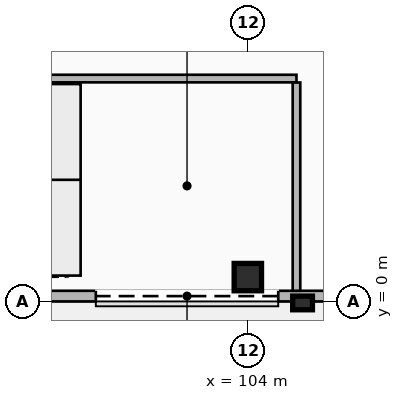
"""IFC4 building model, lengths in metres.
Left out: names, types, materials, properties, quantities, classifications, styles, units other than length and angle.
Written with IfcOpenShell. Run it as: python <this file> out.ifc"""

import sys

from ifc_helpers import new_model, si_unit, direction, frame, frame_2d, origin, origin_2d, place, context, subcontext, project, spatial, rectangle, extrude, element, fill, save


model = new_model("IFC4")
c1 = context("Model", 3, precision=1e-05, world=origin(), true_north=direction((0.0, 1.0)))
c2 = subcontext(c1, "Body", "Model", "MODEL_VIEW")
j1 = project(units=[si_unit("LENGTHUNIT", "METRE"), si_unit("PLANEANGLEUNIT", "RADIAN")], contexts=[c1])
p1 = place(None, origin())
s1 = spatial("IfcSite", under=j1, at=p1, CompositionType="ELEMENT")
p2 = place(p1, origin())
s2 = spatial("IfcBuilding", under=s1, at=p2, CompositionType="ELEMENT")
p3 = place(p2, origin())
s3 = spatial("IfcBuildingStorey", under=s2, at=p3, CompositionType="ELEMENT", Elevation=0.0)
p4 = place(p3, frame((104.0, 0.8, 0.0), z_axis=(0.0, 0.0, 1.0), x_axis=(1.0, 0.0, 0.0)))
e1 = element("IfcColumn", 1, at=p4, inside=s3, PredefinedType="COLUMN", context=c2, shape_type="SweptSolid", body=[
    extrude(rectangle(XDim=0.9, YDim=0.9, at=origin_2d()), origin(), (0.0, 0.0, 1.0), 5.14),
])
p5 = place(p3, frame((144.0, 0.175, 0.0), z_axis=(0.0, 0.0, 1.0), x_axis=(-1.0, 0.0, 0.0)))
e2 = element("IfcWall", 2, at=p5, inside=s3, PredefinedType="SOLIDWALL", context=c2, shape_type="SweptSolid", body=[
    extrude(rectangle(XDim=144.0, YDim=0.35, at=frame_2d((72.0, 0.0))), origin(), (0.0, 0.0, 1.0), 5.14),
])
p6 = place(p5, frame((39.0, 0.0, 0.0)))
e3 = element("IfcOpeningElement", 3, at=p6, cuts=e2, PredefinedType="OPENING", context=c2, shape_type="SweptSolid", body=[
    extrude(rectangle(XDim=6.0, YDim=3.2, at=frame_2d((3.0, 1.6))), frame((0.0, 0.185, 0.0), z_axis=(0.0, -1.0, 0.0), x_axis=(1.0, 0.0, 0.0)), (0.0, 0.0, 1.0), 0.37),
])
p7 = place(p5, frame((73.2, 0.0, 0.0)))
e4 = element("IfcOpeningElement", 4, at=p7, cuts=e2, PredefinedType="OPENING", context=c2, shape_type="SweptSolid", body=[
    extrude(rectangle(XDim=2.6, YDim=2.75, at=frame_2d((1.3, 1.375))), frame((0.0, 0.185, 0.0), z_axis=(0.0, -1.0, 0.0), x_axis=(1.0, 0.0, 0.0)), (0.0, 0.0, 1.0), 0.37),
])
p8 = place(p5, frame((58.6, 0.0, 0.0)))
e5 = element("IfcOpeningElement", 5, at=p8, cuts=e2, PredefinedType="OPENING", context=c2, shape_type="SweptSolid", body=[
    extrude(rectangle(XDim=2.6, YDim=2.75, at=frame_2d((1.3, 1.375))), frame((0.0, 0.185, 0.0), z_axis=(0.0, -1.0, 0.0), x_axis=(1.0, 0.0, 0.0)), (0.0, 0.0, 1.0), 0.37),
])
p9 = place(p5, frame((128.7, 0.0, 0.0)))
e6 = element("IfcOpeningElement", 6, at=p9, cuts=e2, PredefinedType="OPENING", context=c2, shape_type="SweptSolid", body=[
    extrude(rectangle(XDim=2.1, YDim=2.5, at=frame_2d((1.05, 1.25))), frame((0.0, 0.185, 0.0), z_axis=(0.0, -1.0, 0.0), x_axis=(1.0, 0.0, 0.0)), (0.0, 0.0, 1.0), 0.37),
])
p10 = place(p5, frame((117.4, 0.0, 0.0)))
e7 = element("IfcOpeningElement", 7, at=p10, cuts=e2, PredefinedType="OPENING", context=c2, shape_type="SweptSolid", body=[
    extrude(rectangle(XDim=2.1, YDim=2.5, at=frame_2d((1.05, 1.25))), frame((0.0, 0.185, 0.0), z_axis=(0.0, -1.0, 0.0), x_axis=(1.0, 0.0, 0.0)), (0.0, 0.0, 1.0), 0.37),
])
p11 = place(p5, frame((91.4, 0.0, 0.0)))
e8 = element("IfcOpeningElement", 8, at=p11, cuts=e2, PredefinedType="OPENING", context=c2, shape_type="SweptSolid", body=[
    extrude(rectangle(XDim=2.1, YDim=2.5, at=frame_2d((1.05, 1.25))), frame((0.0, 0.185, 0.0), z_axis=(0.0, -1.0, 0.0), x_axis=(1.0, 0.0, 0.0)), (0.0, 0.0, 1.0), 0.37),
])
p12 = place(p5, frame((68.7, 0.0, 0.0)))
e9 = element("IfcOpeningElement", 9, at=p12, cuts=e2, PredefinedType="OPENING", context=c2, shape_type="SweptSolid", body=[
    extrude(rectangle(XDim=2.1, YDim=2.5, at=frame_2d((1.05, 1.25))), frame((0.0, 0.185, 0.0), z_axis=(0.0, -1.0, 0.0), x_axis=(1.0, 0.0, 0.0)), (0.0, 0.0, 1.0), 0.37),
])
p13 = place(p5, frame((105.5, 0.0, 0.95)))
e10 = element("IfcOpeningElement", 10, at=p13, cuts=e2, PredefinedType="OPENING", context=c2, shape_type="SweptSolid", body=[
    extrude(rectangle(XDim=3.0, YDim=2.4, at=frame_2d((1.5, 1.2))), frame((0.0, 0.185, 0.0), z_axis=(0.0, -1.0, 0.0), x_axis=(1.0, 0.0, 0.0)), (0.0, 0.0, 1.0), 0.37),
])
p14 = place(p5, frame((99.5, 0.0, 0.95)))
e11 = element("IfcOpeningElement", 11, at=p14, cuts=e2, PredefinedType="OPENING", context=c2, shape_type="SweptSolid", body=[
    extrude(rectangle(XDim=3.0, YDim=2.4, at=frame_2d((1.5, 1.2))), frame((0.0, 0.185, 0.0), z_axis=(0.0, -1.0, 0.0), x_axis=(1.0, 0.0, 0.0)), (0.0, 0.0, 1.0), 0.37),
])
p15 = place(p5, frame((84.5, 0.0, 0.95)))
e12 = element("IfcOpeningElement", 12, at=p15, cuts=e2, PredefinedType="OPENING", context=c2, shape_type="SweptSolid", body=[
    extrude(rectangle(XDim=3.0, YDim=2.4, at=frame_2d((1.5, 1.2))), frame((0.0, 0.185, 0.0), z_axis=(0.0, -1.0, 0.0), x_axis=(1.0, 0.0, 0.0)), (0.0, 0.0, 1.0), 0.37),
])
p16 = place(p5, frame((30.5, 0.0, 0.95)))
e13 = element("IfcOpeningElement", 13, at=p16, cuts=e2, PredefinedType="OPENING", context=c2, shape_type="SweptSolid", body=[
    extrude(rectangle(XDim=3.0, YDim=2.4, at=frame_2d((1.5, 1.2))), frame((0.0, 0.185, 0.0), z_axis=(0.0, -1.0, 0.0), x_axis=(1.0, 0.0, 0.0)), (0.0, 0.0, 1.0), 0.37),
])
p17 = place(p5, frame((14.5, 0.0, 0.95)))
e14 = element("IfcOpeningElement", 14, at=p17, cuts=e2, PredefinedType="OPENING", context=c2, shape_type="SweptSolid", body=[
    extrude(rectangle(XDim=3.0, YDim=2.4, at=frame_2d((1.5, 1.2))), frame((0.0, 0.185, 0.0), z_axis=(0.0, -1.0, 0.0), x_axis=(1.0, 0.0, 0.0)), (0.0, 0.0, 1.0), 0.37),
])
p18 = place(p3, frame((105.8, -0.05, 0.0), z_axis=(0.0, 0.0, 1.0), x_axis=(1.0, 0.0, 0.0)))
e15 = element("IfcColumn", 15, at=p18, inside=s3, PredefinedType="PILASTER", context=c2, shape_type="SweptSolid", body=[
    extrude(rectangle(XDim=0.65, YDim=0.45, at=origin_2d()), origin(), (0.0, 0.0, 1.0), 5.14),
])
p19 = place(p3, frame((64.35, 7.33, 0.0), z_axis=(0.0, 0.0, 1.0), x_axis=(1.0, 0.0, 0.0)))
e16 = element("IfcWall", 16, at=p19, inside=s3, PredefinedType="SOLIDWALL", context=c2, shape_type="SweptSolid", body=[
    extrude(rectangle(XDim=41.25, YDim=0.25, at=frame_2d((20.625, 0.0))), origin(), (0.0, 0.0, 1.0), 5.14),
])
p20 = place(p3, frame((105.6, 0.35, 0.0), z_axis=(0.0, 0.0, 1.0), x_axis=(0.0, 1.0, 0.0)))
e17 = element("IfcWall", 17, at=p20, inside=s3, PredefinedType="SOLIDWALL", context=c2, shape_type="SweptSolid", body=[
    extrude(rectangle(XDim=6.85, YDim=0.25, at=frame_2d((3.425, 0.0))), origin(), (0.0, 0.0, 1.0), 3.31),
])
p21 = place(p6, origin())
e18 = element("IfcDoor", 18, at=p21, inside=s3, OperationType="ROLLINGUP", PredefinedType="GATE", context=c2, shape_type="SweptSolid", body=[
    extrude(rectangle(XDim=6.0, YDim=3.2, at=frame_2d((3.0, 1.6))), frame((0.0, 0.025, 0.0), z_axis=(0.0, -1.0, 0.0), x_axis=(1.0, 0.0, 0.0)), (0.0, 0.0, 1.0), 0.05),
])
fill(e3, e18)
save(model, sys.argv[1])
